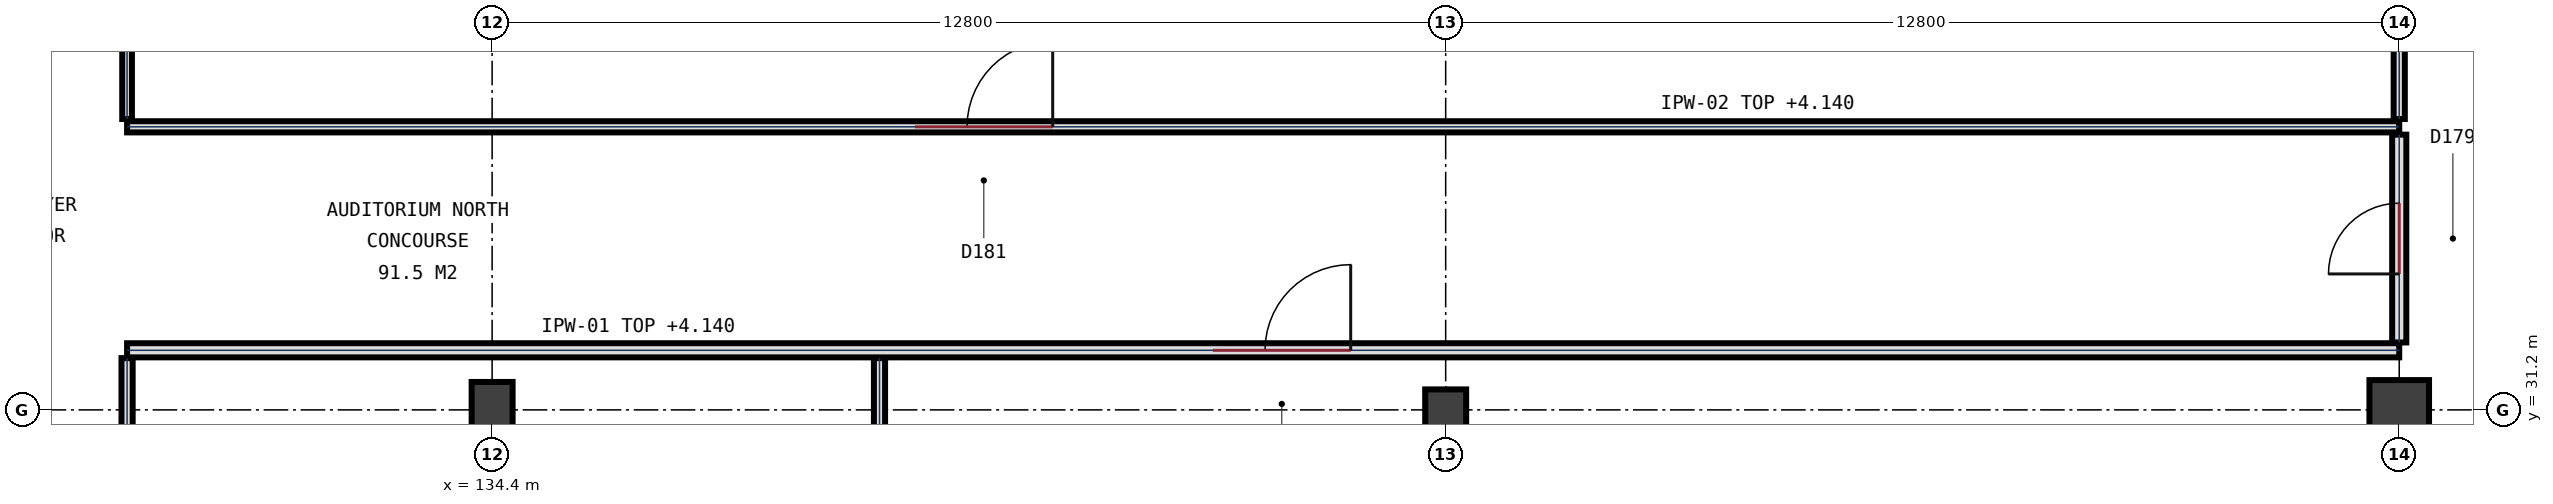
"""IFC4 building model, lengths in metres.
Left out: names, types, materials, properties, quantities, classifications, styles, units other than length and angle.
Written with IfcOpenShell. Run it as: python <this file> out.ifc"""

import sys

from ifc_helpers import new_model, si_unit, direction, frame, frame_2d, origin, origin_2d, place, context, subcontext, project, spatial, rectangle, circle, extrude, element, fill, save


model = new_model("IFC4")
c1 = context("Model", 3, precision=1e-05, world=origin(), true_north=direction((0.0, 1.0)))
c2 = subcontext(c1, "Body", "Model", "MODEL_VIEW")
j1 = project(units=[si_unit("LENGTHUNIT", "METRE"), si_unit("PLANEANGLEUNIT", "RADIAN")], contexts=[c1])
p1 = place(None, origin())
s1 = spatial("IfcSite", under=j1, at=p1, CompositionType="ELEMENT")
p2 = place(p1, origin())
s2 = spatial("IfcBuilding", under=s1, at=p2, CompositionType="ELEMENT")
p3 = place(p2, origin())
s3 = spatial("IfcBuildingStorey", under=s2, at=p3, CompositionType="ELEMENT", Elevation=0.0)
p4 = place(p3, frame((134.4, 31.2, 0.0), z_axis=(0.0, 0.0, 1.0), x_axis=(0.0, 1.0, 0.0)))
e1 = element("IfcColumn", 1, at=p4, inside=s3, PredefinedType="COLUMN", context=c2, shape_type="SweptSolid", body=[
    extrude(rectangle(XDim=0.75, YDim=0.55, at=origin_2d()), origin(), (0.0, 0.0, 1.0), 5.4),
])
p5 = place(p3, frame((147.2, 31.2, 0.0), z_axis=(0.0, 0.0, 1.0), x_axis=(1.0, 0.0, 0.0)))
e2 = element("IfcColumn", 2, at=p5, inside=s3, PredefinedType="COLUMN", context=c2, shape_type="SweptSolid", body=[
    extrude(rectangle(XDim=0.55, YDim=0.55, at=origin_2d()), origin(), (0.0, 0.0, 1.0), 5.4),
])
p6 = place(p3, frame((160.0, 31.2, 0.0), z_axis=(0.0, 0.0, 1.0), x_axis=(1.0, 0.0, 0.0)))
e3 = element("IfcColumn", 3, at=p6, inside=s3, PredefinedType="COLUMN", context=c2, shape_type="SweptSolid", body=[
    extrude(circle(Radius=0.4, at=origin_2d()), origin(), (0.0, 0.0, 1.0), 5.4),
])
p7 = place(p3, frame((129.5, 32.0, 0.0), z_axis=(0.0, 0.0, 1.0), x_axis=(1.0, 0.0, 0.0)))
e4 = element("IfcWall", 4, at=p7, inside=s3, PredefinedType="PARTITIONING", context=c2, shape_type="SweptSolid", body=[
    extrude(rectangle(XDim=30.5, YDim=0.19, at=frame_2d((15.25, 0.0))), origin(), (0.0, 0.0, 1.0), 4.14),
])
p8 = place(p7, frame((14.575, 0.0, 0.0)))
e5 = element("IfcOpeningElement", 5, at=p8, cuts=e4, PredefinedType="OPENING", context=c2, shape_type="SweptSolid", body=[
    extrude(rectangle(XDim=1.85, YDim=2.35, at=frame_2d((0.925, 1.175))), frame((0.0, 0.105, 0.0), z_axis=(0.0, -1.0, 0.0), x_axis=(1.0, 0.0, 0.0)), (0.0, 0.0, 1.0), 0.21),
])
p9 = place(p3, frame((129.5, 35.0, 0.0), z_axis=(0.0, 0.0, 1.0), x_axis=(1.0, 0.0, 0.0)))
e6 = element("IfcWall", 6, at=p9, inside=s3, PredefinedType="PARTITIONING", context=c2, shape_type="SweptSolid", body=[
    extrude(rectangle(XDim=30.5, YDim=0.15, at=frame_2d((15.25, 0.0))), origin(), (0.0, 0.0, 1.0), 4.14),
])
p10 = place(p9, frame((10.575, 0.0, 0.0)))
e7 = element("IfcOpeningElement", 7, at=p10, cuts=e6, PredefinedType="OPENING", context=c2, shape_type="SweptSolid", body=[
    extrude(rectangle(XDim=1.85, YDim=2.35, at=frame_2d((0.925, 1.175))), frame((0.0, 0.085, 0.0), z_axis=(0.0, -1.0, 0.0), x_axis=(1.0, 0.0, 0.0)), (0.0, 0.0, 1.0), 0.17),
])
p11 = place(p3, frame((129.5, 23.955, 0.0), z_axis=(0.0, 0.0, 1.0), x_axis=(0.0, 1.0, 0.0)))
e8 = element("IfcWall", 8, at=p11, inside=s3, PredefinedType="PARTITIONING", context=c2, shape_type="SweptSolid", body=[
    extrude(rectangle(XDim=7.94, YDim=0.15, at=frame_2d((3.97, 0.0))), origin(), (0.0, 0.0, 1.0), 4.09),
])
p12 = place(p11, frame((3.545, 0.0, 0.0)))
e9 = element("IfcOpeningElement", 9, at=p12, cuts=e8, PredefinedType="OPENING", context=c2, shape_type="SweptSolid", body=[
    extrude(rectangle(XDim=1.0, YDim=2.2, at=frame_2d((0.5, 1.1))), frame((0.0, 0.085, 0.0), z_axis=(0.0, -1.0, 0.0), x_axis=(1.0, 0.0, 0.0)), (0.0, 0.0, 1.0), 0.17),
])
p13 = place(p3, frame((129.5, 35.105, 0.0), z_axis=(0.0, 0.0, 1.0), x_axis=(0.0, 1.0, 0.0)))
e10 = element("IfcWall", 10, at=p13, inside=s3, PredefinedType="PARTITIONING", context=c2, shape_type="SweptSolid", body=[
    extrude(rectangle(XDim=5.59, YDim=0.13, at=frame_2d((2.795, 0.0))), origin(), (0.0, 0.0, 1.0), 4.54),
])
p14 = place(p3, frame((139.6, 23.955, 0.0), z_axis=(0.0, 0.0, 1.0), x_axis=(0.0, 1.0, 0.0)))
e11 = element("IfcWall", 11, at=p14, inside=s3, PredefinedType="PARTITIONING", context=c2, shape_type="SweptSolid", body=[
    extrude(rectangle(XDim=7.94, YDim=0.15, at=frame_2d((3.97, 0.0))), origin(), (0.0, 0.0, 1.0), 4.54),
])
p15 = place(p3, frame((160.0, 32.105, 0.0), z_axis=(0.0, 0.0, 1.0), x_axis=(0.0, 1.0, 0.0)))
e12 = element("IfcWall", 12, at=p15, inside=s3, PredefinedType="PARTITIONING", context=c2, shape_type="SweptSolid", body=[
    extrude(rectangle(XDim=2.79, YDim=0.19, at=frame_2d((1.395, 0.0))), origin(), (0.0, 0.0, 1.0), 4.14),
])
p16 = place(p15, frame((0.92, 0.0, 0.0)))
e13 = element("IfcOpeningElement", 13, at=p16, cuts=e12, PredefinedType="OPENING", context=c2, shape_type="SweptSolid", body=[
    extrude(rectangle(XDim=0.95, YDim=2.15, at=frame_2d((0.475, 1.075))), frame((0.0, 0.105, 0.0), z_axis=(0.0, -1.0, 0.0), x_axis=(1.0, 0.0, 0.0)), (0.0, 0.0, 1.0), 0.21),
])
p17 = place(p3, frame((160.0, 35.105, 0.0), z_axis=(0.0, 0.0, 1.0), x_axis=(0.0, 1.0, 0.0)))
e14 = element("IfcWall", 14, at=p17, inside=s3, PredefinedType="PARTITIONING", context=c2, shape_type="SweptSolid", body=[
    extrude(rectangle(XDim=5.342, YDim=0.15, at=frame_2d((2.671, 0.0))), origin(), (0.0, 0.0, 1.0), 4.14),
])
p18 = place(p8, origin())
e15 = element("IfcDoor", 15, at=p18, inside=s3, OperationType="SINGLE_SWING_RIGHT", PredefinedType="DOOR", context=c2, shape_type="SweptSolid", body=[
    extrude(rectangle(XDim=1.85, YDim=2.35, at=frame_2d((0.925, 1.175))), frame((0.0, 0.032, 0.0), z_axis=(0.0, -1.0, 0.0), x_axis=(1.0, 0.0, 0.0)), (0.0, 0.0, 1.0), 0.065),
])
fill(e5, e15)
p19 = place(p16, origin())
e16 = element("IfcDoor", 16, at=p19, inside=s3, OperationType="SINGLE_SWING_LEFT", PredefinedType="DOOR", context=c2, shape_type="SweptSolid", body=[
    extrude(rectangle(XDim=0.95, YDim=2.15, at=frame_2d((0.475, 1.075))), frame((0.0, 0.032, 0.0), z_axis=(0.0, -1.0, 0.0), x_axis=(1.0, 0.0, 0.0)), (0.0, 0.0, 1.0), 0.065),
])
fill(e13, e16)
p20 = place(p10, origin())
e17 = element("IfcDoor", 17, at=p20, inside=s3, OperationType="SINGLE_SWING_RIGHT", PredefinedType="DOOR", context=c2, shape_type="SweptSolid", body=[
    extrude(rectangle(XDim=1.85, YDim=2.35, at=frame_2d((0.925, 1.175))), frame((0.0, 0.032, 0.0), z_axis=(0.0, -1.0, 0.0), x_axis=(1.0, 0.0, 0.0)), (0.0, 0.0, 1.0), 0.065),
])
fill(e7, e17)
save(model, sys.argv[1])
